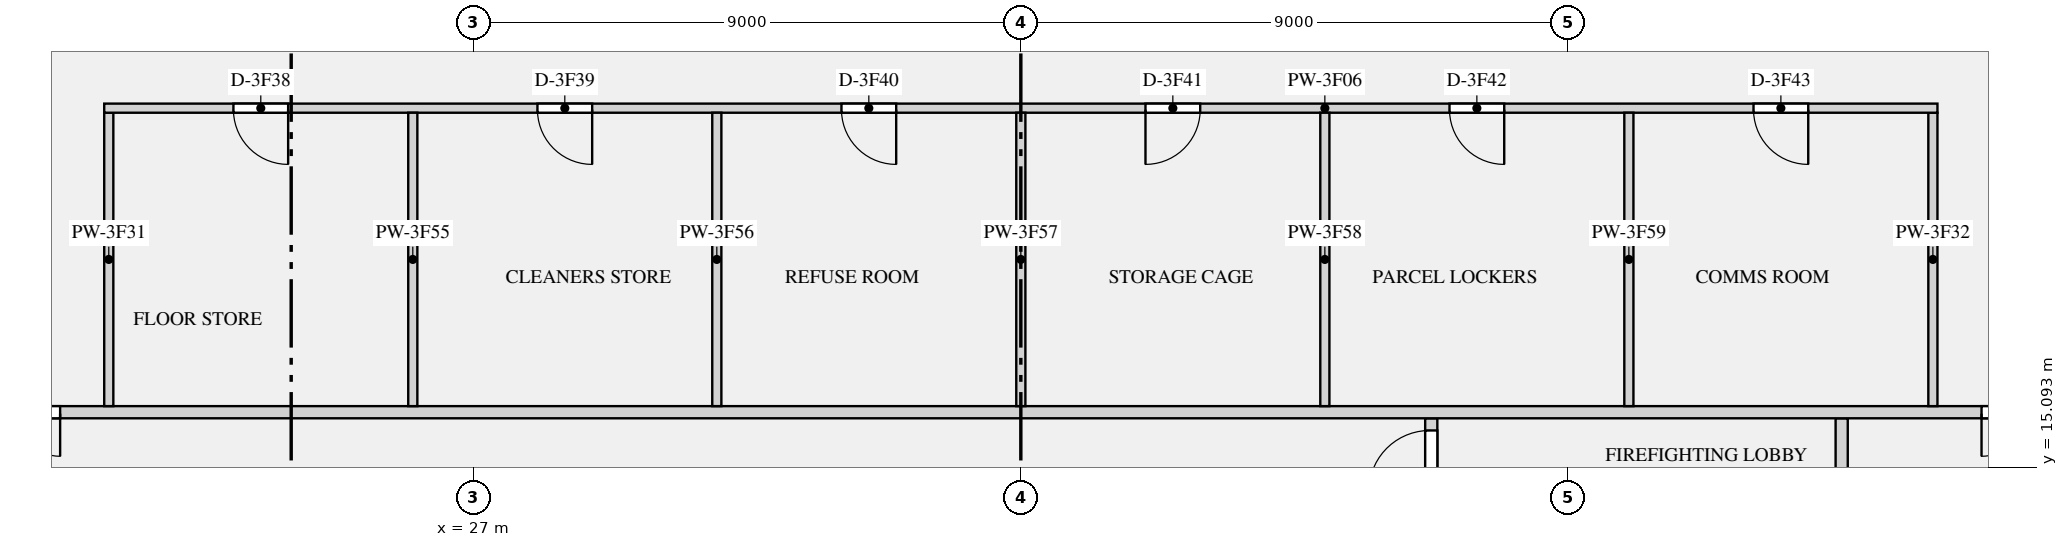
"""IFC4 building model, lengths in metres.
Left out: names, types, materials, properties, quantities, classifications, styles, units other than length and angle.
Written with IfcOpenShell. Run it as: python <this file> out.ifc"""

import sys

from ifc_helpers import new_model, si_unit, direction, frame, frame_2d, origin, place, context, subcontext, project, spatial, rectangle, extrude, element, fill, save


model = new_model("IFC4")
c1 = context("Model", 3, precision=1e-05, world=origin(), true_north=direction((0.0, 1.0)))
c2 = subcontext(c1, "Body", "Model", "MODEL_VIEW")
j1 = project(units=[si_unit("LENGTHUNIT", "METRE"), si_unit("PLANEANGLEUNIT", "RADIAN")], contexts=[c1])
p1 = place(None, origin())
s1 = spatial("IfcSite", under=j1, at=p1, CompositionType="ELEMENT")
p2 = place(p1, origin())
s2 = spatial("IfcBuilding", under=s1, at=p2, CompositionType="ELEMENT")
p3 = place(p2, frame((0.0, 0.0, 182.25)))
s3 = spatial("IfcBuildingStorey", under=s2, at=p3, CompositionType="ELEMENT", Elevation=182.25)
p4 = place(p3, frame((49.5, 12.5, 0.0), z_axis=(0.0, 0.0, 1.0), x_axis=(0.0, 1.0, 0.0)))
e1 = element("IfcWall", 1, at=p4, inside=s3, PredefinedType="PARTITIONING", context=c2, shape_type="SweptSolid", body=[
    extrude(rectangle(XDim=3.4, YDim=0.2, at=frame_2d((1.7, 0.0))), origin(), (0.0, 0.0, 1.0), 2.65),
])
p5 = place(p4, frame((1.15, 0.0, 0.0)))
e2 = element("IfcOpeningElement", 2, at=p5, cuts=e1, PredefinedType="OPENING", context=c2, shape_type="SweptSolid", body=[
    extrude(rectangle(XDim=1.1, YDim=2.1, at=frame_2d((0.55, 1.05))), frame((0.0, 0.11, 0.0), z_axis=(0.0, -1.0, 0.0), x_axis=(1.0, 0.0, 0.0)), (0.0, 0.0, 1.0), 0.22),
])
p6 = place(p3, frame((42.75, 14.575, 0.0), z_axis=(0.0, 0.0, 1.0), x_axis=(0.0, 1.0, 0.0)))
e3 = element("IfcWall", 3, at=p6, inside=s3, PredefinedType="PARTITIONING", context=c2, shape_type="SweptSolid", body=[
    extrude(rectangle(XDim=1.325, YDim=0.2, at=frame_2d((0.663, 0.0))), origin(), (0.0, 0.0, 1.0), 2.65),
])
p7 = place(p6, frame((0.125, 0.0, 0.0)))
e4 = element("IfcOpeningElement", 4, at=p7, cuts=e3, PredefinedType="OPENING", context=c2, shape_type="SweptSolid", body=[
    extrude(rectangle(XDim=1.0, YDim=2.1, at=frame_2d((0.5, 1.05))), frame((0.0, 0.11, 0.0), z_axis=(0.0, -1.0, 0.0), x_axis=(1.0, 0.0, 0.0)), (0.0, 0.0, 1.0), 0.22),
])
p8 = place(p3, frame((20.925, 21.0, 0.0), z_axis=(0.0, 0.0, 1.0), x_axis=(1.0, 0.0, 0.0)))
e5 = element("IfcWall", 5, at=p8, inside=s3, PredefinedType="PARTITIONING", context=c2, shape_type="SweptSolid", body=[
    extrude(rectangle(XDim=30.15, YDim=0.15, at=frame_2d((15.075, 0.0))), origin(), (0.0, 0.0, 1.0), 2.65),
])
p9 = place(p8, frame((2.125, 0.0, 0.0)))
e6 = element("IfcOpeningElement", 6, at=p9, cuts=e5, PredefinedType="OPENING", context=c2, shape_type="SweptSolid", body=[
    extrude(rectangle(XDim=0.9, YDim=2.1, at=frame_2d((0.45, 1.05))), frame((0.0, 0.085, 0.0), z_axis=(0.0, -1.0, 0.0), x_axis=(1.0, 0.0, 0.0)), (0.0, 0.0, 1.0), 0.17),
])
p10 = place(p8, frame((7.125, 0.0, 0.0)))
e7 = element("IfcOpeningElement", 7, at=p10, cuts=e5, PredefinedType="OPENING", context=c2, shape_type="SweptSolid", body=[
    extrude(rectangle(XDim=0.9, YDim=2.1, at=frame_2d((0.45, 1.05))), frame((0.0, 0.085, 0.0), z_axis=(0.0, -1.0, 0.0), x_axis=(1.0, 0.0, 0.0)), (0.0, 0.0, 1.0), 0.17),
])
p11 = place(p8, frame((12.125, 0.0, 0.0)))
e8 = element("IfcOpeningElement", 8, at=p11, cuts=e5, PredefinedType="OPENING", context=c2, shape_type="SweptSolid", body=[
    extrude(rectangle(XDim=0.9, YDim=2.1, at=frame_2d((0.45, 1.05))), frame((0.0, 0.085, 0.0), z_axis=(0.0, -1.0, 0.0), x_axis=(1.0, 0.0, 0.0)), (0.0, 0.0, 1.0), 0.17),
])
p12 = place(p8, frame((17.125, 0.0, 0.0)))
e9 = element("IfcOpeningElement", 9, at=p12, cuts=e5, PredefinedType="OPENING", context=c2, shape_type="SweptSolid", body=[
    extrude(rectangle(XDim=0.9, YDim=2.1, at=frame_2d((0.45, 1.05))), frame((0.0, 0.085, 0.0), z_axis=(0.0, -1.0, 0.0), x_axis=(1.0, 0.0, 0.0)), (0.0, 0.0, 1.0), 0.17),
])
p13 = place(p8, frame((22.125, 0.0, 0.0)))
e10 = element("IfcOpeningElement", 10, at=p13, cuts=e5, PredefinedType="OPENING", context=c2, shape_type="SweptSolid", body=[
    extrude(rectangle(XDim=0.9, YDim=2.1, at=frame_2d((0.45, 1.05))), frame((0.0, 0.085, 0.0), z_axis=(0.0, -1.0, 0.0), x_axis=(1.0, 0.0, 0.0)), (0.0, 0.0, 1.0), 0.17),
])
p14 = place(p8, frame((27.125, 0.0, 0.0)))
e11 = element("IfcOpeningElement", 11, at=p14, cuts=e5, PredefinedType="OPENING", context=c2, shape_type="SweptSolid", body=[
    extrude(rectangle(XDim=0.9, YDim=2.1, at=frame_2d((0.45, 1.05))), frame((0.0, 0.085, 0.0), z_axis=(0.0, -1.0, 0.0), x_axis=(1.0, 0.0, 0.0)), (0.0, 0.0, 1.0), 0.17),
])
p15 = place(p3, frame((17.9, 16.0, 0.0), z_axis=(0.0, 0.0, 1.0), x_axis=(1.0, 0.0, 0.0)))
e12 = element("IfcWall", 12, at=p15, inside=s3, PredefinedType="PARTITIONING", context=c2, shape_type="SweptSolid", body=[
    extrude(rectangle(XDim=36.2, YDim=0.2, at=frame_2d((18.1, 0.0))), origin(), (0.0, 0.0, 1.0), 2.65),
])
p16 = place(p15, frame((0.9, 0.0, 0.0)))
e13 = element("IfcOpeningElement", 13, at=p16, cuts=e12, PredefinedType="OPENING", context=c2, shape_type="SweptSolid", body=[
    extrude(rectangle(XDim=1.4, YDim=2.1, at=frame_2d((0.7, 1.05))), frame((0.0, 0.11, 0.0), z_axis=(0.0, -1.0, 0.0), x_axis=(1.0, 0.0, 0.0)), (0.0, 0.0, 1.0), 0.22),
])
p17 = place(p15, frame((33.9, 0.0, 0.0)))
e14 = element("IfcOpeningElement", 14, at=p17, cuts=e12, PredefinedType="OPENING", context=c2, shape_type="SweptSolid", body=[
    extrude(rectangle(XDim=1.4, YDim=2.1, at=frame_2d((0.7, 1.05))), frame((0.0, 0.11, 0.0), z_axis=(0.0, -1.0, 0.0), x_axis=(1.0, 0.0, 0.0)), (0.0, 0.0, 1.0), 0.22),
])
for number, where, z_axis, x_axis in (
    (15, (21.0, 16.1, 0.0), (0.0, 0.0, 1.0), (0.0, 1.0, 0.0)),
    (16, (51.0, 16.1, 0.0), (0.0, 0.0, 1.0), (0.0, 1.0, 0.0)),
    (17, (26.0, 16.1, 0.0), (0.0, 0.0, 1.0), (0.0, 1.0, 0.0)),
    (18, (31.0, 16.1, 0.0), (0.0, 0.0, 1.0), (0.0, 1.0, 0.0)),
    (19, (36.0, 16.1, 0.0), (0.0, 0.0, 1.0), (0.0, 1.0, 0.0)),
    (20, (41.0, 16.1, 0.0), (0.0, 0.0, 1.0), (0.0, 1.0, 0.0)),
    (21, (46.0, 16.1, 0.0), (0.0, 0.0, 1.0), (0.0, 1.0, 0.0)),
):
    element("IfcWall", number, at=place(p3, frame(where, z_axis=z_axis, x_axis=x_axis)), inside=s3, PredefinedType="PARTITIONING", context=c2, shape_type="SweptSolid", body=[
        extrude(rectangle(XDim=4.825, YDim=0.15, at=frame_2d((2.413, 0.0))), origin(), (0.0, 0.0, 1.0), 2.65),
    ])
p18 = place(p7, origin())
e22 = element("IfcDoor", 22, at=p18, inside=s3, OperationType="SINGLE_SWING_LEFT", PredefinedType="DOOR", context=c2, shape_type="SweptSolid", body=[
    extrude(rectangle(XDim=1.0, YDim=2.1, at=frame_2d((0.5, 1.05))), frame((0.0, 0.025, 0.0), z_axis=(0.0, -1.0, 0.0), x_axis=(1.0, 0.0, 0.0)), (0.0, 0.0, 1.0), 0.05),
])
fill(e4, e22)
p19 = place(p16, frame((1.4, 0.0, 0.0), z_axis=(0.0, 0.0, 1.0), x_axis=(-1.0, 0.0, 0.0)))
e23 = element("IfcDoor", 23, at=p19, inside=s3, OperationType="DOUBLE_DOOR_SINGLE_SWING", PredefinedType="DOOR", context=c2, shape_type="SweptSolid", body=[
    extrude(rectangle(XDim=1.4, YDim=2.1, at=frame_2d((0.7, 1.05))), frame((0.0, 0.025, 0.0), z_axis=(0.0, -1.0, 0.0), x_axis=(1.0, 0.0, 0.0)), (0.0, 0.0, 1.0), 0.05),
])
fill(e13, e23)
p20 = place(p17, frame((1.4, 0.0, 0.0), z_axis=(0.0, 0.0, 1.0), x_axis=(-1.0, 0.0, 0.0)))
e24 = element("IfcDoor", 24, at=p20, inside=s3, OperationType="DOUBLE_DOOR_SINGLE_SWING", PredefinedType="DOOR", context=c2, shape_type="SweptSolid", body=[
    extrude(rectangle(XDim=1.4, YDim=2.1, at=frame_2d((0.7, 1.05))), frame((0.0, 0.025, 0.0), z_axis=(0.0, -1.0, 0.0), x_axis=(1.0, 0.0, 0.0)), (0.0, 0.0, 1.0), 0.05),
])
fill(e14, e24)
p21 = place(p9, frame((0.9, 0.0, 0.0), z_axis=(0.0, 0.0, 1.0), x_axis=(-1.0, 0.0, 0.0)))
e25 = element("IfcDoor", 25, at=p21, inside=s3, OperationType="SINGLE_SWING_LEFT", PredefinedType="DOOR", context=c2, shape_type="SweptSolid", body=[
    extrude(rectangle(XDim=0.9, YDim=2.1, at=frame_2d((0.45, 1.05))), frame((0.0, 0.025, 0.0), z_axis=(0.0, -1.0, 0.0), x_axis=(1.0, 0.0, 0.0)), (0.0, 0.0, 1.0), 0.05),
])
fill(e6, e25)
p22 = place(p10, frame((0.9, 0.0, 0.0), z_axis=(0.0, 0.0, 1.0), x_axis=(-1.0, 0.0, 0.0)))
e26 = element("IfcDoor", 26, at=p22, inside=s3, OperationType="SINGLE_SWING_LEFT", PredefinedType="DOOR", context=c2, shape_type="SweptSolid", body=[
    extrude(rectangle(XDim=0.9, YDim=2.1, at=frame_2d((0.45, 1.05))), frame((0.0, 0.025, 0.0), z_axis=(0.0, -1.0, 0.0), x_axis=(1.0, 0.0, 0.0)), (0.0, 0.0, 1.0), 0.05),
])
fill(e7, e26)
p23 = place(p11, frame((0.9, 0.0, 0.0), z_axis=(0.0, 0.0, 1.0), x_axis=(-1.0, 0.0, 0.0)))
e27 = element("IfcDoor", 27, at=p23, inside=s3, OperationType="SINGLE_SWING_LEFT", PredefinedType="DOOR", context=c2, shape_type="SweptSolid", body=[
    extrude(rectangle(XDim=0.9, YDim=2.1, at=frame_2d((0.45, 1.05))), frame((0.0, 0.025, 0.0), z_axis=(0.0, -1.0, 0.0), x_axis=(1.0, 0.0, 0.0)), (0.0, 0.0, 1.0), 0.05),
])
fill(e8, e27)
p24 = place(p12, frame((0.9, 0.0, 0.0), z_axis=(0.0, 0.0, 1.0), x_axis=(-1.0, 0.0, 0.0)))
e28 = element("IfcDoor", 28, at=p24, inside=s3, OperationType="SINGLE_SWING_RIGHT", PredefinedType="DOOR", context=c2, shape_type="SweptSolid", body=[
    extrude(rectangle(XDim=0.9, YDim=2.1, at=frame_2d((0.45, 1.05))), frame((0.0, 0.025, 0.0), z_axis=(0.0, -1.0, 0.0), x_axis=(1.0, 0.0, 0.0)), (0.0, 0.0, 1.0), 0.05),
])
fill(e9, e28)
p25 = place(p13, frame((0.9, 0.0, 0.0), z_axis=(0.0, 0.0, 1.0), x_axis=(-1.0, 0.0, 0.0)))
e29 = element("IfcDoor", 29, at=p25, inside=s3, OperationType="SINGLE_SWING_LEFT", PredefinedType="DOOR", context=c2, shape_type="SweptSolid", body=[
    extrude(rectangle(XDim=0.9, YDim=2.1, at=frame_2d((0.45, 1.05))), frame((0.0, 0.025, 0.0), z_axis=(0.0, -1.0, 0.0), x_axis=(1.0, 0.0, 0.0)), (0.0, 0.0, 1.0), 0.05),
])
fill(e10, e29)
p26 = place(p14, frame((0.9, 0.0, 0.0), z_axis=(0.0, 0.0, 1.0), x_axis=(-1.0, 0.0, 0.0)))
e30 = element("IfcDoor", 30, at=p26, inside=s3, OperationType="SINGLE_SWING_LEFT", PredefinedType="DOOR", context=c2, shape_type="SweptSolid", body=[
    extrude(rectangle(XDim=0.9, YDim=2.1, at=frame_2d((0.45, 1.05))), frame((0.0, 0.025, 0.0), z_axis=(0.0, -1.0, 0.0), x_axis=(1.0, 0.0, 0.0)), (0.0, 0.0, 1.0), 0.05),
])
fill(e11, e30)
save(model, sys.argv[1])
